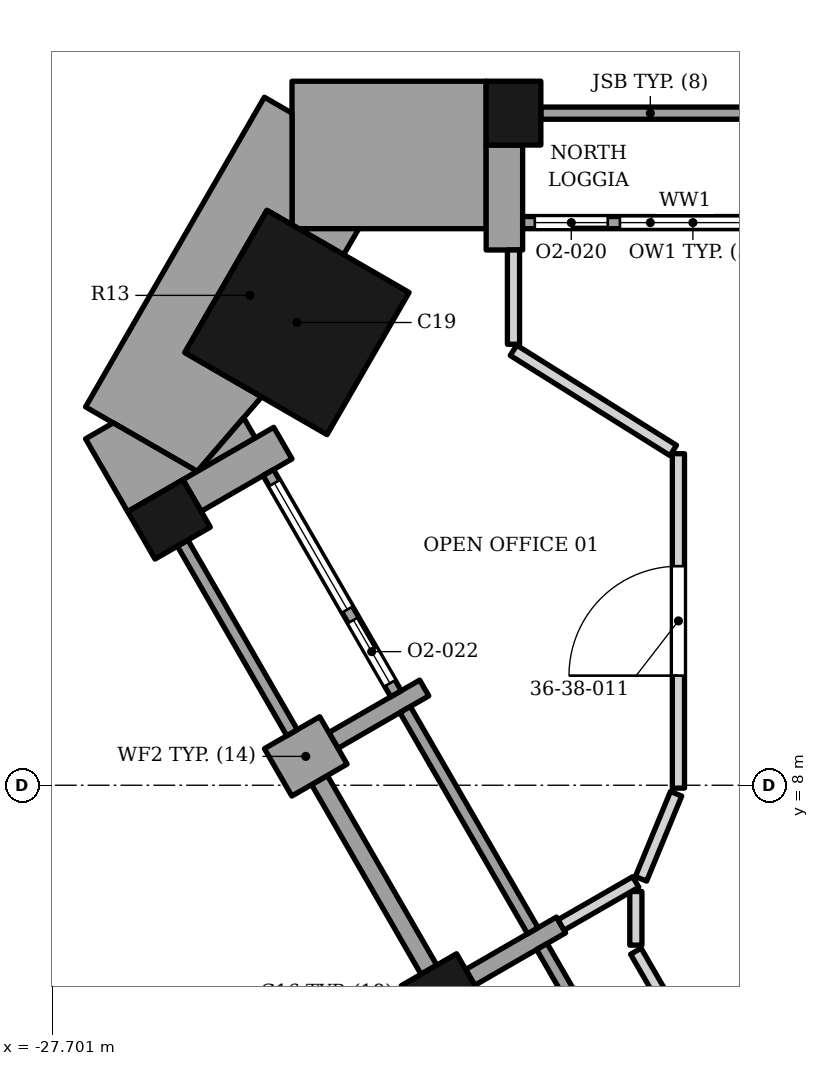
"""IFC4 building model, lengths in metres.
Left out: names, types, materials, properties, quantities, classifications, styles, units other than length and angle.
Written with IfcOpenShell. Run it as: python <this file> out.ifc"""

import sys

from ifc_helpers import new_model, si_unit, direction, frame, frame_2d, origin, origin_2d, place, context, subcontext, project, spatial, polyline, rectangle, outline, extrude, element, fill, save


model = new_model("IFC4")
c1 = context("Model", 3, precision=1e-05, world=origin(), true_north=direction((0.0, 1.0)))
c2 = subcontext(c1, "Body", "Model", "MODEL_VIEW")
j1 = project(units=[si_unit("LENGTHUNIT", "METRE"), si_unit("PLANEANGLEUNIT", "RADIAN")], contexts=[c1])
p1 = place(None, origin())
s1 = spatial("IfcSite", under=j1, at=p1, CompositionType="ELEMENT")
p2 = place(p1, origin())
s2 = spatial("IfcBuilding", under=s1, at=p2, CompositionType="ELEMENT")
p3 = place(p2, frame((0.0, 0.0, 156.3)))
s3 = spatial("IfcBuildingStorey", under=s2, at=p3, CompositionType="ELEMENT", Elevation=156.3)
p4 = place(p3, frame((-23.674, 15.61, 0.0), z_axis=(0.0, 0.0, 1.0), x_axis=(0.866025386331, -0.50000003023, 0.0)))
e1 = element("IfcColumn", 1, at=p4, inside=s3, PredefinedType="COLUMN", context=c2, shape_type="SweptSolid", body=[
    extrude(rectangle(XDim=2.7, YDim=2.7, at=origin_2d()), origin(), (0.0, 0.0, 1.0), 3.9),
])
for number, where, z_axis, x_axis in (
    (2, (-25.779, 12.372, 0.0), (0.0, 0.0, 1.0), (0.5, -0.866, 0.0)),
    (3, (-21.279, 4.577, 0.0), (0.0, 0.0, 1.0), (0.5, -0.866, 0.0)),
    (4, (-20.113, 19.053, 0.0), (0.0, 0.0, 1.0), (-1.0, 0.0, 0.0)),
):
    element("IfcColumn", number, at=place(p3, frame(where, z_axis=z_axis, x_axis=x_axis)), inside=s3, PredefinedType="COLUMN", context=c2, shape_type="SweptSolid", body=[
        extrude(rectangle(XDim=0.9, YDim=1.05, at=origin_2d()), origin(), (0.0, 0.0, 1.0), 3.9),
    ])
p5 = place(p3, frame((-25.399, 12.764, 0.0), z_axis=(0.0, 0.0, 1.0), x_axis=(0.866004044806, 0.500036993012, 0.0)))
e5 = element("IfcWall", 5, at=p5, inside=s3, PredefinedType="SOLIDWALL", context=c2, shape_type="SweptSolid", body=[
    extrude(rectangle(XDim=1.724, YDim=0.6, at=frame_2d((0.862, 0.0))), origin(), (0.0, 0.0, 1.0), 3.0),
])
p6 = place(p3, frame((-23.075, 8.737, 0.0), z_axis=(0.0, 0.0, 1.0), x_axis=(-0.86592997719, -0.500165247297, 0.0)))
e6 = element("IfcWall", 6, at=p6, inside=s3, PredefinedType="SOLIDWALL", context=c2, shape_type="SweptSolid", body=[
    extrude(rectangle(XDim=1.05, YDim=0.9, at=frame_2d((0.525, 0.0))), origin(), (0.0, 0.0, 1.0), 3.0),
])
p7 = place(p3, frame((-23.075, 8.737, 0.0), z_axis=(0.0, 0.0, 1.0), x_axis=(0.866013532718, 0.500020560727, 0.0)))
e7 = element("IfcWall", 7, at=p7, inside=s3, PredefinedType="SOLIDWALL", context=c2, shape_type="SweptSolid", body=[
    extrude(rectangle(XDim=1.725, YDim=0.3, at=frame_2d((0.863, 0.0))), origin(), (0.0, 0.0, 1.0), 3.0),
])
p8 = place(p3, frame((-19.331, 5.702, 0.0), z_axis=(0.0, 0.0, 1.0), x_axis=(-0.86597814115, -0.500081852351, 0.0)))
e8 = element("IfcWall", 8, at=p8, inside=s3, PredefinedType="SOLIDWALL", context=c2, shape_type="SweptSolid", body=[
    extrude(rectangle(XDim=1.725, YDim=0.3, at=frame_2d((0.862, 0.0))), origin(), (0.0, 0.0, 1.0), 2.95),
])
p9 = place(p3, frame((-25.554, 11.982, 0.0), z_axis=(0.0, 0.0, 1.0), x_axis=(0.499961193289, -0.866047807691, 0.0)))
e9 = element("IfcWall", 9, at=p9, inside=s3, PredefinedType="SOLIDWALL", context=c2, shape_type="SweptSolid", body=[
    extrude(rectangle(XDim=3.6, YDim=0.2, at=frame_2d((1.8, 0.0))), origin(), (0.0, 0.0, 1.0), 3.0),
])
p10 = place(p3, frame((-24.146, 13.142, 0.0), z_axis=(0.0, 0.0, 1.0), x_axis=(0.500027713859, -0.866009402589, 0.0)))
e10 = element("IfcWall", 10, at=p10, inside=s3, PredefinedType="ELEMENTEDWALL", context=c2, shape_type="SweptSolid", body=[
    extrude(rectangle(XDim=4.2, YDim=0.2, at=frame_2d((2.1, 0.0))), origin(), (0.0, 0.0, 1.0), 3.0),
])
p11 = place(p10, frame((0.2, 0.0, 0.45)))
e11 = element("IfcOpeningElement", 11, at=p11, cuts=e10, PredefinedType="OPENING", context=c2, shape_type="SweptSolid", body=[
    extrude(rectangle(XDim=2.4, YDim=2.25, at=frame_2d((1.2, 1.125))), frame((0.0, 0.11, 0.0), z_axis=(0.0, -1.0, 0.0), x_axis=(1.0, 0.0, 0.0)), (0.0, 0.0, 1.0), 0.22),
])
p12 = place(p10, frame((2.8, 0.0, 0.0)))
e12 = element("IfcOpeningElement", 12, at=p12, cuts=e10, PredefinedType="OPENING", context=c2, shape_type="SweptSolid", body=[
    extrude(rectangle(XDim=1.2, YDim=2.7, at=frame_2d((0.6, 1.35))), frame((0.0, 0.11, 0.0), z_axis=(0.0, -1.0, 0.0), x_axis=(1.0, 0.0, 0.0)), (0.0, 0.0, 1.0), 0.22),
])
p13 = place(p3, frame((-23.304, 8.085, 0.0), z_axis=(0.0, 0.0, 1.0), x_axis=(0.499961193289, -0.866047807691, 0.0)))
e13 = element("IfcWall", 13, at=p13, inside=s3, PredefinedType="SOLIDWALL", context=c2, shape_type="SweptSolid", body=[
    extrude(rectangle(XDim=3.6, YDim=0.3, at=frame_2d((1.8, 0.0))), origin(), (0.0, 0.0, 1.0), 3.0),
])
p14 = place(p3, frame((-21.896, 9.245, 0.0), z_axis=(0.0, 0.0, 1.0), x_axis=(0.500002543286, -0.866023935413, 0.0)))
e14 = element("IfcWall", 14, at=p14, inside=s3, PredefinedType="ELEMENTEDWALL", context=c2, shape_type="SweptSolid", body=[
    extrude(rectangle(XDim=4.2, YDim=0.2, at=frame_2d((2.1, 0.0))), origin(), (0.0, 0.0, 1.0), 3.0),
])
p15 = place(p3, frame((-19.646, 5.347, 0.0), z_axis=(0.0, 0.0, 1.0), x_axis=(0.500027713859, -0.866009402589, 0.0)))
e15 = element("IfcWall", 15, at=p15, inside=s3, PredefinedType="ELEMENTEDWALL", context=c2, shape_type="SweptSolid", body=[
    extrude(rectangle(XDim=4.2, YDim=0.2, at=frame_2d((2.1, 0.0))), origin(), (0.0, 0.0, 1.0), 2.95),
])
p16 = place(p3, origin())
e16 = element("IfcWall", 16, at=p16, inside=s3, PredefinedType="SOLIDWALL", context=c2, shape_type="SweptSolid", body=[
    extrude(outline(polyline([(-20.562, 18.528), (-20.562, 16.802), (-19.963, 16.802), (-19.963, 18.528), (-20.562, 18.528)])), origin(), (0.0, 0.0, 1.0), 3.0),
])
p17 = place(p3, frame((-16.062, 19.052, 0.0), z_axis=(0.0, 0.0, 1.0), x_axis=(-1.0, 0.0, 0.0)))
e17 = element("IfcWall", 17, at=p17, inside=s3, PredefinedType="SOLIDWALL", context=c2, shape_type="SweptSolid", body=[
    extrude(rectangle(XDim=3.6, YDim=0.2, at=frame_2d((1.8, 0.0))), origin(), (0.0, 0.0, 1.0), 3.0),
])
p18 = place(p3, frame((-15.762, 17.252, 0.0), z_axis=(0.0, 0.0, 1.0), x_axis=(-1.0, 0.0, 0.0)))
e18 = element("IfcWall", 18, at=p18, inside=s3, PredefinedType="ELEMENTEDWALL", context=c2, shape_type="SweptSolid", body=[
    extrude(rectangle(XDim=4.2, YDim=0.2, at=frame_2d((2.1, 0.0))), origin(), (0.0, 0.0, 1.0), 3.0),
])
p19 = place(p18, frame((0.2, 0.0, 0.45)))
e19 = element("IfcOpeningElement", 19, at=p19, cuts=e18, PredefinedType="OPENING", context=c2, shape_type="SweptSolid", body=[
    extrude(rectangle(XDim=2.4, YDim=2.25, at=frame_2d((1.2, 1.125))), frame((0.0, 0.11, 0.0), z_axis=(0.0, -1.0, 0.0), x_axis=(1.0, 0.0, 0.0)), (0.0, 0.0, 1.0), 0.22),
])
p20 = place(p18, frame((2.8, 0.0, 0.0)))
e20 = element("IfcOpeningElement", 20, at=p20, cuts=e18, PredefinedType="OPENING", context=c2, shape_type="SweptSolid", body=[
    extrude(rectangle(XDim=1.2, YDim=2.7, at=frame_2d((0.6, 1.35))), frame((0.0, 0.11, 0.0), z_axis=(0.0, -1.0, 0.0), x_axis=(1.0, 0.0, 0.0)), (0.0, 0.0, 1.0), 0.22),
])
p21 = place(p3, origin())
e21 = element("IfcWall", 21, at=p21, inside=s3, PredefinedType="SOLIDWALL", context=c2, shape_type="SweptSolid", body=[
    extrude(outline(polyline([(-23.646, 17.153), (-20.562, 17.153), (-20.562, 18.528), (-20.563, 18.528), (-20.563, 19.578), (-23.756, 19.578), (-23.756, 17.216), (-23.646, 17.153)])), origin(), (0.0, 0.0, 1.0), 3.0),
])
p22 = place(p3, origin())
e22 = element("IfcWall", 22, at=p22, inside=s3, PredefinedType="SOLIDWALL", context=c2, shape_type="SweptSolid", body=[
    extrude(outline(polyline([(-24.255, 14.387), (-25.518, 15.116), (-24.168, 17.454), (-23.756, 17.216), (-23.756, 19.052), (-24.21, 19.315), (-27.151, 14.222), (-25.312, 13.161), (-24.255, 14.387)])), origin(), (0.0, 0.0, 1.0), 3.0),
])
p23 = place(p3, origin())
e23 = element("IfcWall", 23, at=p23, inside=s3, PredefinedType="SOLIDWALL", context=c2, shape_type="SweptSolid", body=[
    extrude(outline(polyline([(-22.659, 17.153), (-23.646, 17.153), (-22.906, 16.725), (-22.659, 17.153)])), origin(), (0.0, 0.0, 1.0), 3.0),
])
p24 = place(p3, origin())
e24 = element("IfcWall", 24, at=p24, inside=s3, PredefinedType="SOLIDWALL", context=c2, shape_type="SweptSolid", body=[
    extrude(outline(polyline([(-26.696, 13.959), (-27.151, 13.697), (-26.459, 12.499), (-25.312, 13.161), (-26.696, 13.959)])), origin(), (0.0, 0.0, 1.0), 3.0),
])
p25 = place(p3, origin())
e25 = element("IfcWall", 25, at=p25, inside=s3, PredefinedType="SOLIDWALL", context=c2, shape_type="SweptSolid", body=[
    extrude(outline(polyline([(-24.551, 14.044), (-25.306, 13.168), (-25.304, 13.166), (-24.359, 13.711), (-24.551, 14.044)])), origin(), (0.0, 0.0, 1.0), 3.0),
])
p26 = place(p3, frame((-18.101, 5.271, 0.0), z_axis=(0.0, 0.0, 1.0), x_axis=(0.500065993159, -0.865987299264, 0.0)))
e26 = element("IfcWall", 26, at=p26, inside=s3, PredefinedType="PARTITIONING", context=c2, shape_type="SweptSolid", body=[
    extrude(rectangle(XDim=1.538, YDim=0.2, at=frame_2d((0.769, 0.0))), origin(), (0.0, 0.0, 1.0), 2.95),
])
p27 = place(p3, frame((-18.101, 6.253, 0.0), z_axis=(0.0, 0.0, 1.0), x_axis=(0.0, -1.0, 0.0)))
e27 = element("IfcWall", 27, at=p27, inside=s3, PredefinedType="PARTITIONING", context=c2, shape_type="SweptSolid", body=[
    extrude(rectangle(XDim=0.882, YDim=0.2, at=frame_2d((0.441, 0.0))), origin(), (0.0, 0.0, 1.0), 2.95),
])
p28 = place(p3, frame((-19.331, 5.702, 0.0), z_axis=(0.0, 0.0, 1.0), x_axis=(0.866606662927, 0.498991875455, 0.0)))
e28 = element("IfcWall", 28, at=p28, inside=s3, PredefinedType="PARTITIONING", context=c2, shape_type="SweptSolid", body=[
    extrude(rectangle(XDim=1.418, YDim=0.2, at=frame_2d((0.709, 0.0))), origin(), (0.0, 0.0, 1.0), 3.73),
])
p29 = place(p3, frame((-18.016, 6.461, 0.0), z_axis=(0.0, 0.0, 1.0), x_axis=(0.381577373497, 0.924336901803, 0.0)))
e29 = element("IfcWall", 29, at=p29, inside=s3, PredefinedType="PARTITIONING", context=c2, shape_type="SweptSolid", body=[
    extrude(rectangle(XDim=1.513, YDim=0.2, at=frame_2d((0.757, 0.0))), origin(), (0.0, 0.0, 1.0), 3.73),
])
p30 = place(p3, frame((-17.4, 7.953, 0.0), z_axis=(0.0, 0.0, 1.0), x_axis=(0.0, 1.0, 0.0)))
e30 = element("IfcWall", 30, at=p30, inside=s3, PredefinedType="PARTITIONING", context=c2, shape_type="SweptSolid", body=[
    extrude(rectangle(XDim=5.5, YDim=0.2, at=frame_2d((2.75, 0.0))), origin(), (0.0, 0.0, 1.0), 3.73),
])
p31 = place(p30, frame((1.85, 0.0, 0.0)))
e31 = element("IfcOpeningElement", 31, at=p31, cuts=e30, PredefinedType="OPENING", context=c2, shape_type="SweptSolid", body=[
    extrude(rectangle(XDim=1.8, YDim=2.4, at=frame_2d((0.9, 1.2))), frame((0.0, 0.11, 0.0), z_axis=(0.0, -1.0, 0.0), x_axis=(1.0, 0.0, 0.0)), (0.0, 0.0, 1.0), 0.22),
])
p32 = place(p3, frame((-20.113, 15.152, 0.0), z_axis=(0.0, 0.0, 1.0), x_axis=(0.847356354359, -0.531024678078, 0.0)))
e32 = element("IfcWall", 32, at=p32, inside=s3, PredefinedType="PARTITIONING", context=c2, shape_type="SweptSolid", body=[
    extrude(rectangle(XDim=3.101, YDim=0.2, at=frame_2d((1.551, 0.0))), origin(), (0.0, 0.0, 1.0), 3.73),
])
p33 = place(p3, frame((-20.113, 16.802, 0.0), z_axis=(0.0, 0.0, 1.0), x_axis=(0.000157480313, -0.9999999876, 0.0)))
e33 = element("IfcWall", 33, at=p33, inside=s3, PredefinedType="PARTITIONING", context=c2, shape_type="SweptSolid", body=[
    extrude(rectangle(XDim=1.55, YDim=0.2, at=frame_2d((0.775, 0.0))), origin(), (0.0, 0.0, 1.0), 3.73),
])
p34 = place(p11, origin())
e34 = element("IfcWindow", 34, at=p34, inside=s3, PartitioningType="SINGLE_PANEL", PredefinedType="WINDOW", context=c2, shape_type="SweptSolid", body=[
    extrude(rectangle(XDim=2.4, YDim=2.25, at=frame_2d((1.2, 1.125))), frame((0.0, 0.03, 0.0), z_axis=(0.0, -1.0, 0.0), x_axis=(1.0, 0.0, 0.0)), (0.0, 0.0, 1.0), 0.06),
])
fill(e11, e34)
p35 = place(p12, origin())
e35 = element("IfcDoor", 35, at=p35, inside=s3, OperationType="SINGLE_SWING_LEFT", PredefinedType="DOOR", context=c2, shape_type="SweptSolid", body=[
    extrude(rectangle(XDim=1.2, YDim=2.7, at=frame_2d((0.6, 1.35))), frame((0.0, 0.025, 0.0), z_axis=(0.0, -1.0, 0.0), x_axis=(1.0, 0.0, 0.0)), (0.0, 0.0, 1.0), 0.05),
])
fill(e12, e35)
p36 = place(p19, origin())
e36 = element("IfcWindow", 36, at=p36, inside=s3, PartitioningType="SINGLE_PANEL", PredefinedType="WINDOW", context=c2, shape_type="SweptSolid", body=[
    extrude(rectangle(XDim=2.4, YDim=2.25, at=frame_2d((1.2, 1.125))), frame((0.0, 0.03, 0.0), z_axis=(0.0, -1.0, 0.0), x_axis=(1.0, 0.0, 0.0)), (0.0, 0.0, 1.0), 0.06),
])
fill(e19, e36)
p37 = place(p20, origin())
e37 = element("IfcDoor", 37, at=p37, inside=s3, OperationType="SINGLE_SWING_LEFT", PredefinedType="DOOR", context=c2, shape_type="SweptSolid", body=[
    extrude(rectangle(XDim=1.2, YDim=2.7, at=frame_2d((0.6, 1.35))), frame((0.0, 0.025, 0.0), z_axis=(0.0, -1.0, 0.0), x_axis=(1.0, 0.0, 0.0)), (0.0, 0.0, 1.0), 0.05),
])
fill(e20, e37)
p38 = place(p31, origin())
e38 = element("IfcDoor", 38, at=p38, inside=s3, OperationType="DOUBLE_DOOR_SINGLE_SWING", PredefinedType="DOOR", context=c2, shape_type="SweptSolid", body=[
    extrude(rectangle(XDim=1.8, YDim=2.4, at=frame_2d((0.9, 1.2))), frame((0.0, 0.025, 0.0), z_axis=(0.0, -1.0, 0.0), x_axis=(1.0, 0.0, 0.0)), (0.0, 0.0, 1.0), 0.05),
])
fill(e31, e38)
save(model, sys.argv[1])
